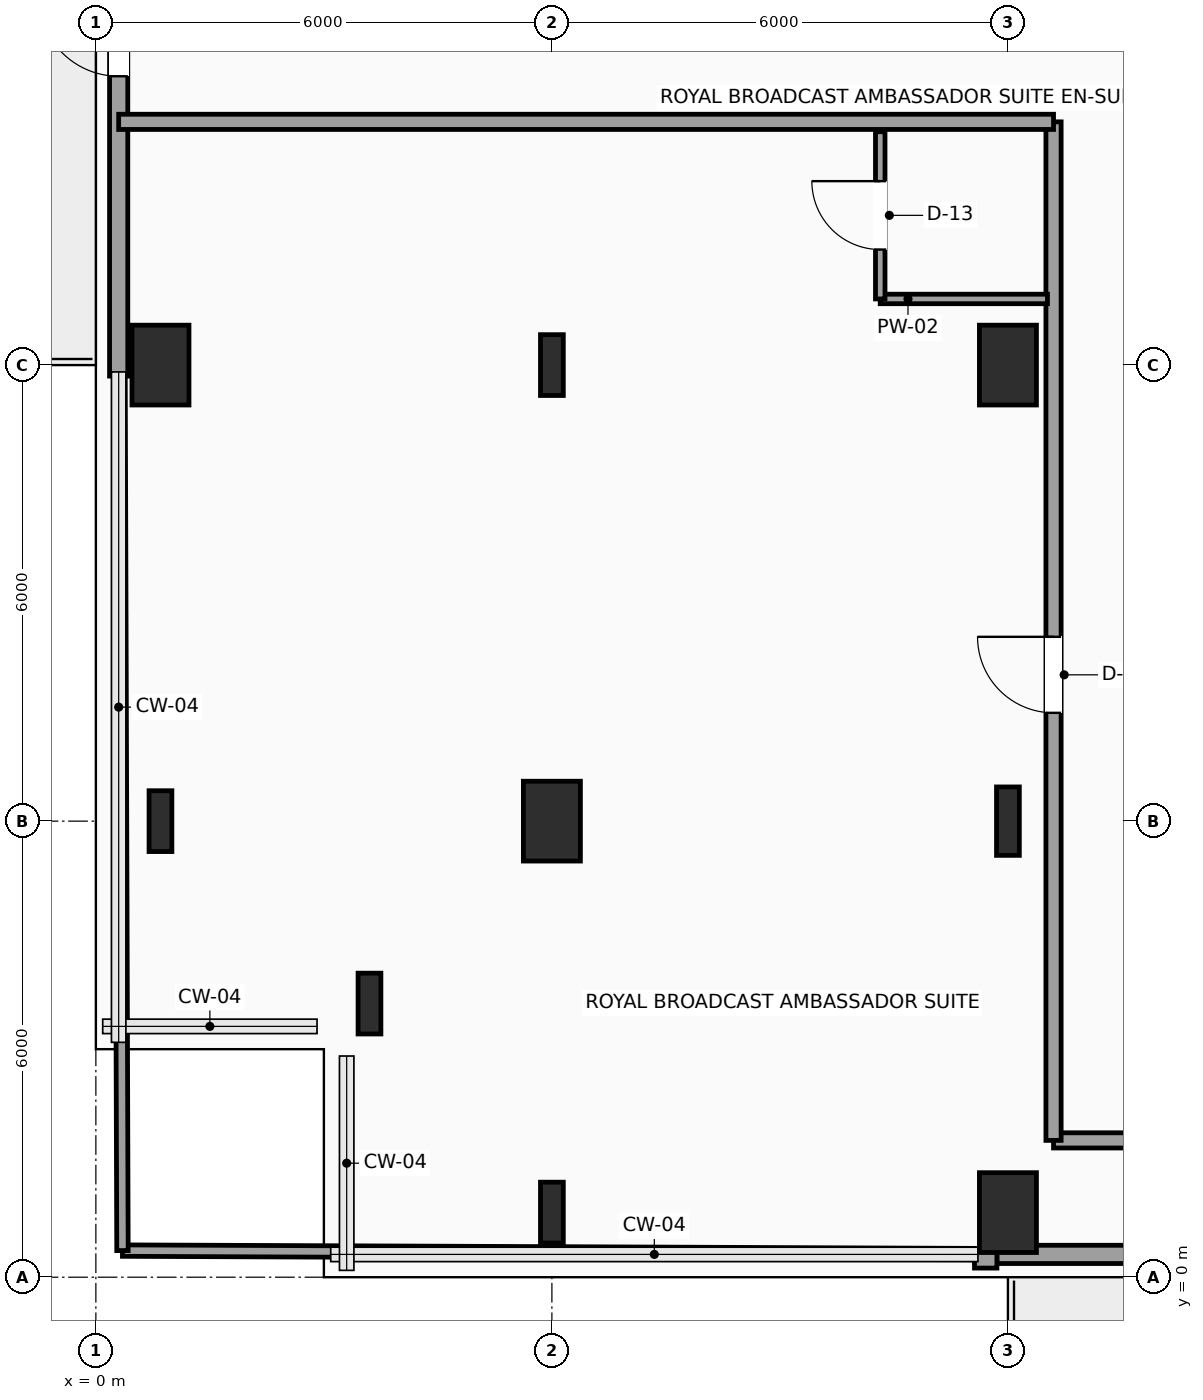
"""IFC4 building model, lengths in metres.
Left out: names, types, materials, properties, quantities, classifications, styles, units other than length and angle.
Written with IfcOpenShell. Run it as: python <this file> out.ifc"""

import sys

from ifc_helpers import new_model, si_unit, direction, frame, frame_2d, origin, origin_2d, place, context, subcontext, project, spatial, rectangle, i_section, extrude, element, fill, save


model = new_model("IFC4")
c1 = context("Model", 3, precision=1e-05, world=origin(), true_north=direction((0.0, 1.0)))
c2 = subcontext(c1, "Body", "Model", "MODEL_VIEW")
j1 = project(units=[si_unit("LENGTHUNIT", "METRE"), si_unit("PLANEANGLEUNIT", "RADIAN")], contexts=[c1])
p1 = place(None, origin())
s1 = spatial("IfcSite", under=j1, at=p1, CompositionType="ELEMENT")
p2 = place(p1, origin())
s2 = spatial("IfcBuilding", under=s1, at=p2, CompositionType="ELEMENT")
p3 = place(p2, frame((0.0, 0.0, 223.65)))
s3 = spatial("IfcBuildingStorey", under=s2, at=p3, CompositionType="ELEMENT", Elevation=223.65)
for number, where, z_axis, x_axis in (
    (1, (3.6, 3.6, 0.0), (0.0, 0.0, 1.0), (1.0, 0.0, 0.0)),
    (2, (0.85, 6.0, 0.0), (0.0, 0.0, 1.0), (1.0, 0.0, 0.0)),
):
    element("IfcColumn", number, at=place(p3, frame(where, z_axis=z_axis, x_axis=x_axis)), inside=s3, PredefinedType="COLUMN", context=c2, shape_type="SweptSolid", body=[
        extrude(i_section(OverallWidth=0.3, OverallDepth=0.8, WebThickness=0.018, FlangeThickness=0.033, FilletRadius=0.03, at=origin_2d()), origin(), (0.0, 0.0, 1.0), 3.75),
    ])
p4 = place(p3, frame((0.85, 12.0, 0.0), z_axis=(0.0, 0.0, 1.0), x_axis=(1.0, 0.0, 0.0)))
e3 = element("IfcColumn", 3, at=p4, inside=s3, PredefinedType="COLUMN", context=c2, shape_type="SweptSolid", body=[
    extrude(rectangle(XDim=0.75, YDim=1.05, at=origin_2d()), origin(), (0.0, 0.0, 1.0), 3.75),
])
p5 = place(p3, frame((6.0, 0.85, 0.0), z_axis=(0.0, 0.0, 1.0), x_axis=(1.0, 0.0, 0.0)))
e4 = element("IfcColumn", 4, at=p5, inside=s3, PredefinedType="COLUMN", context=c2, shape_type="SweptSolid", body=[
    extrude(i_section(OverallWidth=0.3, OverallDepth=0.8, WebThickness=0.018, FlangeThickness=0.033, FilletRadius=0.03, at=origin_2d()), origin(), (0.0, 0.0, 1.0), 3.75),
])
p6 = place(p3, frame((6.0, 6.0, 0.0), z_axis=(0.0, 0.0, 1.0), x_axis=(1.0, 0.0, 0.0)))
e5 = element("IfcColumn", 5, at=p6, inside=s3, PredefinedType="COLUMN", context=c2, shape_type="SweptSolid", body=[
    extrude(rectangle(XDim=0.75, YDim=1.05, at=origin_2d()), origin(), (0.0, 0.0, 1.0), 3.75),
])
p7 = place(p3, frame((6.0, 12.0, 0.0), z_axis=(0.0, 0.0, 1.0), x_axis=(1.0, 0.0, 0.0)))
e6 = element("IfcColumn", 6, at=p7, inside=s3, PredefinedType="COLUMN", context=c2, shape_type="SweptSolid", body=[
    extrude(i_section(OverallWidth=0.3, OverallDepth=0.8, WebThickness=0.018, FlangeThickness=0.033, FilletRadius=0.03, at=origin_2d()), origin(), (0.0, 0.0, 1.0), 3.75),
])
p8 = place(p3, frame((12.0, 0.85, 0.0), z_axis=(0.0, 0.0, 1.0), x_axis=(1.0, 0.0, 0.0)))
e7 = element("IfcColumn", 7, at=p8, inside=s3, PredefinedType="COLUMN", context=c2, shape_type="SweptSolid", body=[
    extrude(rectangle(XDim=0.75, YDim=1.05, at=origin_2d()), origin(), (0.0, 0.0, 1.0), 3.75),
])
p9 = place(p3, frame((12.0, 6.0, 0.0), z_axis=(0.0, 0.0, 1.0), x_axis=(1.0, 0.0, 0.0)))
e8 = element("IfcColumn", 8, at=p9, inside=s3, PredefinedType="COLUMN", context=c2, shape_type="SweptSolid", body=[
    extrude(i_section(OverallWidth=0.3, OverallDepth=0.9, WebThickness=0.019, FlangeThickness=0.035, FilletRadius=0.03, at=origin_2d()), origin(), (0.0, 0.0, 1.0), 3.75),
])
p10 = place(p3, frame((12.0, 12.0, 0.0), z_axis=(0.0, 0.0, 1.0), x_axis=(1.0, 0.0, 0.0)))
e9 = element("IfcColumn", 9, at=p10, inside=s3, PredefinedType="COLUMN", context=c2, shape_type="SweptSolid", body=[
    extrude(rectangle(XDim=0.75, YDim=1.05, at=origin_2d()), origin(), (0.0, 0.0, 1.0), 3.75),
])
p11 = place(p3, frame((21.145, 0.3, 0.0), z_axis=(0.0, 0.0, 1.0), x_axis=(-1.0, 0.0, 0.0)))
e10 = element("IfcWall", 10, at=p11, inside=s3, PredefinedType="SOLIDWALL", context=c2, shape_type="SweptSolid", body=[
    extrude(rectangle(XDim=9.29, YDim=0.24, at=frame_2d((4.645, 0.0))), origin(), (0.0, 0.0, 1.0), 3.54),
])
p12 = place(p11, frame((3.945, 0.0, 0.0)))
e11 = element("IfcOpeningElement", 11, at=p12, cuts=e10, PredefinedType="OPENING", context=c2, shape_type="SweptSolid", body=[
    extrude(rectangle(XDim=1.05, YDim=2.2, at=frame_2d((0.525, 1.1))), frame((0.0, 0.13, 0.0), z_axis=(0.0, -1.0, 0.0), x_axis=(1.0, 0.0, 0.0)), (0.0, 0.0, 1.0), 0.26),
])
p13 = place(p11, frame((5.345, 0.0, 0.85)))
e12 = element("IfcOpeningElement", 12, at=p13, cuts=e10, PredefinedType="OPENING", context=c2, shape_type="SweptSolid", body=[
    extrude(rectangle(XDim=2.1, YDim=2.2, at=frame_2d((1.05, 1.1))), frame((0.0, 0.13, 0.0), z_axis=(0.0, -1.0, 0.0), x_axis=(1.0, 0.0, 0.0)), (0.0, 0.0, 1.0), 0.26),
])
p14 = place(p3, frame((0.3, 11.855, 0.0), z_axis=(0.0, 0.0, 1.0), x_axis=(0.0, 1.0, 0.0)))
e13 = element("IfcWall", 13, at=p14, inside=s3, PredefinedType="SOLIDWALL", context=c2, shape_type="SweptSolid", body=[
    extrude(rectangle(XDim=9.29, YDim=0.24, at=frame_2d((4.645, 0.0))), origin(), (0.0, 0.0, 1.0), 3.54),
])
p15 = place(p14, frame((3.945, 0.0, 0.0)))
e14 = element("IfcOpeningElement", 14, at=p15, cuts=e13, PredefinedType="OPENING", context=c2, shape_type="SweptSolid", body=[
    extrude(rectangle(XDim=1.05, YDim=2.2, at=frame_2d((0.525, 1.1))), frame((0.0, 0.13, 0.0), z_axis=(0.0, -1.0, 0.0), x_axis=(1.0, 0.0, 0.0)), (0.0, 0.0, 1.0), 0.26),
])
p16 = place(p3, frame((11.855, 0.24, 0.0), z_axis=(0.0, 0.0, 1.0), x_axis=(-1.0, 0.0, 0.0)))
e15 = element("IfcWall", 15, at=p16, inside=s3, PredefinedType="SOLIDWALL", context=c2, shape_type="SweptSolid", body=[
    extrude(rectangle(XDim=0.295, YDim=0.24, at=frame_2d((0.147, 0.0))), origin(), (0.0, 0.0, 1.0), 3.54),
])
p17 = place(p3, frame((14.95, 1.8, 0.0), z_axis=(0.0, 0.0, 1.0), x_axis=(-1.0, 0.0, 0.0)))
e16 = element("IfcWall", 16, at=p17, inside=s3, PredefinedType="SOLIDWALL", context=c2, shape_type="SweptSolid", body=[
    extrude(rectangle(XDim=2.35, YDim=0.2, at=frame_2d((1.175, 0.0))), origin(), (0.0, 0.0, 1.0), 3.54),
])
p18 = place(p3, frame((12.6, 1.8, 0.0), z_axis=(0.0, 0.0, 1.0), x_axis=(0.0, 1.0, 0.0)))
e17 = element("IfcWall", 17, at=p18, inside=s3, PredefinedType="SOLIDWALL", context=c2, shape_type="SweptSolid", body=[
    extrude(rectangle(XDim=13.4, YDim=0.2, at=frame_2d((6.7, 0.0))), origin(), (0.0, 0.0, 1.0), 3.54),
])
p19 = place(p18, frame((5.625, 0.0, 0.0)))
e18 = element("IfcOpeningElement", 18, at=p19, cuts=e17, PredefinedType="OPENING", context=c2, shape_type="SweptSolid", body=[
    extrude(rectangle(XDim=1.0, YDim=2.2, at=frame_2d((0.5, 1.1))), frame((0.0, 0.11, 0.0), z_axis=(0.0, -1.0, 0.0), x_axis=(1.0, 0.0, 0.0)), (0.0, 0.0, 1.0), 0.22),
])
p20 = place(p3, frame((12.6, 15.2, 0.0), z_axis=(0.0, 0.0, 1.0), x_axis=(-1.0, 0.0, 0.0)))
e19 = element("IfcWall", 19, at=p20, inside=s3, PredefinedType="SOLIDWALL", context=c2, shape_type="SweptSolid", body=[
    extrude(rectangle(XDim=12.3, YDim=0.2, at=frame_2d((6.15, 0.0))), origin(), (0.0, 0.0, 1.0), 3.132),
])
p21 = place(p3, frame((0.35, 0.35, 0.0), z_axis=(0.0, 0.0, 1.0), x_axis=(0.999991617913, -0.004094398993, 0.0)))
e20 = element("IfcWall", 20, at=p21, inside=s3, PredefinedType="PARTITIONING", context=c2, shape_type="SweptSolid", body=[
    extrude(rectangle(XDim=11.21, YDim=0.15, at=frame_2d((5.605, 0.0))), origin(), (0.0, 0.0, 1.0), 3.54),
])
p22 = place(p3, frame((0.35, 0.35, 0.0), z_axis=(0.0, 0.0, 1.0), x_axis=(-0.003374057698, 0.999994307851, 0.0)))
e21 = element("IfcWall", 21, at=p22, inside=s3, PredefinedType="PARTITIONING", context=c2, shape_type="SweptSolid", body=[
    extrude(rectangle(XDim=11.505, YDim=0.15, at=frame_2d((5.752, 0.0))), origin(), (0.0, 0.0, 1.0), 3.54),
])
p23 = place(p3, frame((10.32, 12.87, 0.0), z_axis=(0.0, 0.0, 1.0), x_axis=(1.0, 0.0, 0.0)))
e22 = element("IfcWall", 22, at=p23, inside=s3, PredefinedType="PARTITIONING", context=c2, shape_type="SweptSolid", body=[
    extrude(rectangle(XDim=2.2, YDim=0.125, at=frame_2d((1.1, 0.0))), origin(), (0.0, 0.0, 1.0), 3.54),
])
p24 = place(p3, frame((10.32, 12.87, 0.0), z_axis=(0.0, 0.0, 1.0), x_axis=(0.0, 1.0, 0.0)))
e23 = element("IfcWall", 23, at=p24, inside=s3, PredefinedType="PARTITIONING", context=c2, shape_type="SweptSolid", body=[
    extrude(rectangle(XDim=2.2, YDim=0.125, at=frame_2d((1.1, 0.0))), origin(), (0.0, 0.0, 1.0), 3.54),
])
p25 = place(p24, frame((0.65, 0.0, 0.0)))
e24 = element("IfcOpeningElement", 24, at=p25, cuts=e23, PredefinedType="OPENING", context=c2, shape_type="SweptSolid", body=[
    extrude(rectangle(XDim=0.9, YDim=2.1, at=frame_2d((0.45, 1.05))), frame((0.0, 0.073, 0.0), z_axis=(0.0, -1.0, 0.0), x_axis=(1.0, 0.0, 0.0)), (0.0, 0.0, 1.0), 0.145),
])
p26 = place(p15, origin())
e25 = element("IfcDoor", 25, at=p26, inside=s3, OperationType="SINGLE_SWING_RIGHT", PredefinedType="DOOR", context=c2, shape_type="SweptSolid", body=[
    extrude(rectangle(XDim=1.05, YDim=2.2, at=frame_2d((0.525, 1.1))), frame((0.0, 0.025, 0.0), z_axis=(0.0, -1.0, 0.0), x_axis=(1.0, 0.0, 0.0)), (0.0, 0.0, 1.0), 0.05),
])
fill(e14, e25)
p27 = place(p19, origin())
e26 = element("IfcDoor", 26, at=p27, inside=s3, OperationType="SINGLE_SWING_RIGHT", PredefinedType="DOOR", context=c2, shape_type="SweptSolid", body=[
    extrude(rectangle(XDim=1.0, YDim=2.2, at=frame_2d((0.5, 1.1))), frame((0.0, 0.025, 0.0), z_axis=(0.0, -1.0, 0.0), x_axis=(1.0, 0.0, 0.0)), (0.0, 0.0, 1.0), 0.05),
])
fill(e18, e26)
p28 = place(p25, origin())
e27 = element("IfcDoor", 27, at=p28, inside=s3, OperationType="SINGLE_SWING_RIGHT", PredefinedType="DOOR", context=c2, shape_type="SweptSolid", body=[
    extrude(rectangle(XDim=0.9, YDim=2.1, at=frame_2d((0.45, 1.05))), frame((0.0, 0.025, 0.0), z_axis=(0.0, -1.0, 0.0), x_axis=(1.0, 0.0, 0.0)), (0.0, 0.0, 1.0), 0.05),
])
fill(e24, e27)
save(model, sys.argv[1])
